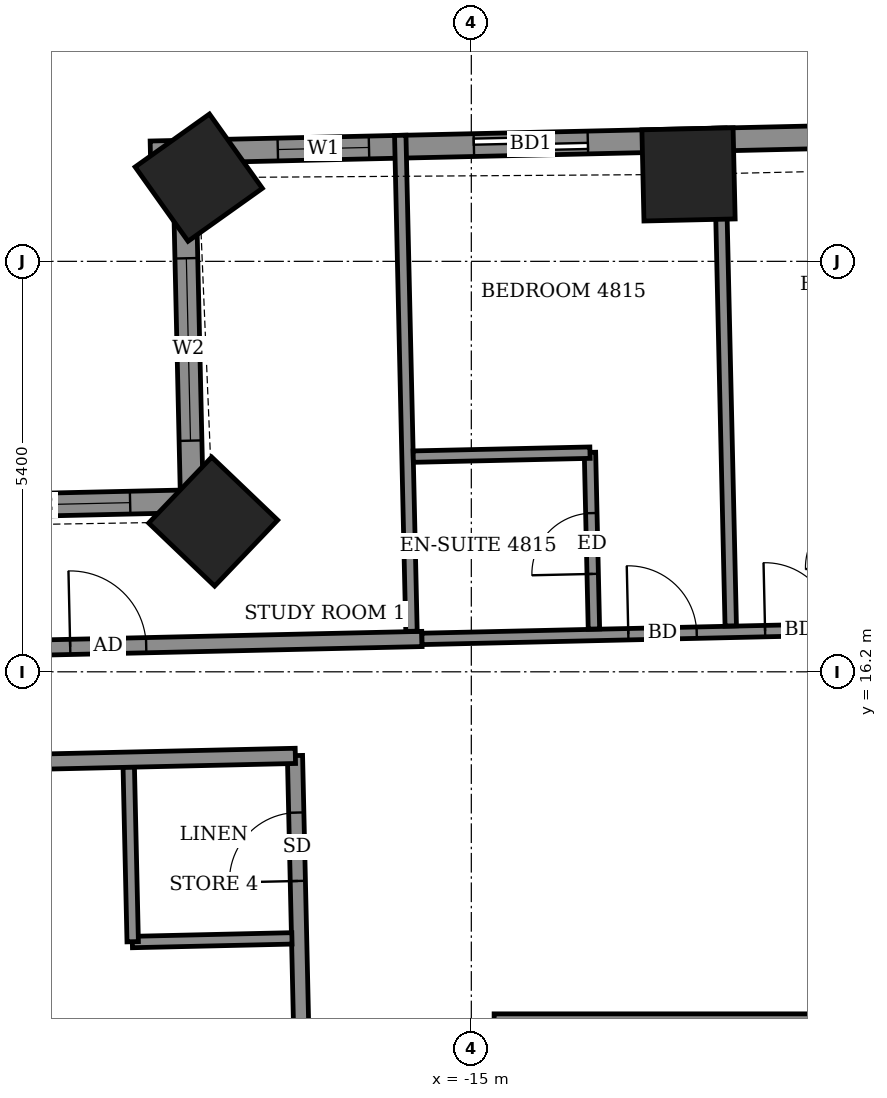
"""IFC4 building model, lengths in metres.
Left out: names, types, materials, properties, quantities, classifications, styles, units other than length and angle.
Written with IfcOpenShell. Run it as: python <this file> out.ifc"""

import sys

from ifc_helpers import new_model, si_unit, direction, frame, frame_2d, origin, origin_2d, place, context, subcontext, project, spatial, rectangle, extrude, element, fill, save


model = new_model("IFC4")
c1 = context("Model", 3, precision=1e-05, world=origin(), true_north=direction((0.0, 1.0)))
c2 = subcontext(c1, "Body", "Model", "MODEL_VIEW")
j1 = project(units=[si_unit("LENGTHUNIT", "METRE"), si_unit("PLANEANGLEUNIT", "RADIAN")], contexts=[c1])
p1 = place(None, origin())
s1 = spatial("IfcSite", under=j1, at=p1, CompositionType="ELEMENT")
p2 = place(p1, origin())
s2 = spatial("IfcBuilding", under=s1, at=p2, CompositionType="ELEMENT")
p3 = place(p2, frame((0.0, 0.0, 189.7)))
s3 = spatial("IfcBuildingStorey", under=s2, at=p3, CompositionType="ELEMENT", Elevation=189.7)
for number, where, z_axis, x_axis in (
    (1, (-12.142, 22.744, -0.55), (0.0, 0.0, 1.0), (-1.0, -0.023, 0.0)),
    (2, (-18.586, 22.701, -0.55), (0.0, 0.0, 1.0), (-0.815, -0.58, 0.0)),
    (3, (-18.396, 18.177, -0.55), (0.0, 0.0, 1.0), (-0.691, -0.723, 0.0)),
):
    element("IfcColumn", number, at=place(p3, frame(where, z_axis=z_axis, x_axis=x_axis)), inside=s3, PredefinedType="COLUMN", context=c2, shape_type="SweptSolid", body=[
        extrude(rectangle(XDim=1.2, YDim=1.2, at=origin_2d()), origin(), (0.0, 0.0, 1.0), 3.6),
    ])
p4 = place(p3, frame((21.589, 23.959, 0.0), z_axis=(0.0, 0.0, 1.0), x_axis=(-0.999742668524, -0.022684724649, 0.0)))
e4 = element("IfcWall", 4, at=p4, inside=s3, PredefinedType="SOLIDWALL", context=c2, shape_type="SweptSolid", body=[
    extrude(rectangle(XDim=40.822, YDim=0.3, at=frame_2d((20.411, 0.0))), origin(), (0.0, 0.0, 1.0), 3.05),
])
p5 = place(p4, frame((1.553, 0.0, 0.0)))
e5 = element("IfcOpeningElement", 5, at=p5, cuts=e4, PredefinedType="OPENING", context=c2, shape_type="SweptSolid", body=[
    extrude(rectangle(XDim=1.5, YDim=2.4, at=frame_2d((0.75, 1.2))), frame((0.0, 0.16, 0.0), z_axis=(0.0, -1.0, 0.0), x_axis=(1.0, 0.0, 0.0)), (0.0, 0.0, 1.0), 0.32),
])
p6 = place(p4, frame((4.33, 0.0, 0.0)))
e6 = element("IfcOpeningElement", 6, at=p6, cuts=e4, PredefinedType="OPENING", context=c2, shape_type="SweptSolid", body=[
    extrude(rectangle(XDim=1.5, YDim=2.4, at=frame_2d((0.75, 1.2))), frame((0.0, 0.16, 0.0), z_axis=(0.0, -1.0, 0.0), x_axis=(1.0, 0.0, 0.0)), (0.0, 0.0, 1.0), 0.32),
])
p7 = place(p4, frame((9.43, 0.0, 0.0)))
e7 = element("IfcOpeningElement", 7, at=p7, cuts=e4, PredefinedType="OPENING", context=c2, shape_type="SweptSolid", body=[
    extrude(rectangle(XDim=1.5, YDim=2.4, at=frame_2d((0.75, 1.2))), frame((0.0, 0.16, 0.0), z_axis=(0.0, -1.0, 0.0), x_axis=(1.0, 0.0, 0.0)), (0.0, 0.0, 1.0), 0.32),
])
p8 = place(p4, frame((14.37, 0.0, 0.0)))
e8 = element("IfcOpeningElement", 8, at=p8, cuts=e4, PredefinedType="OPENING", context=c2, shape_type="SweptSolid", body=[
    extrude(rectangle(XDim=1.5, YDim=2.4, at=frame_2d((0.75, 1.2))), frame((0.0, 0.16, 0.0), z_axis=(0.0, -1.0, 0.0), x_axis=(1.0, 0.0, 0.0)), (0.0, 0.0, 1.0), 0.32),
])
p9 = place(p4, frame((17.41, 0.0, 0.0)))
e9 = element("IfcOpeningElement", 9, at=p9, cuts=e4, PredefinedType="OPENING", context=c2, shape_type="SweptSolid", body=[
    extrude(rectangle(XDim=1.5, YDim=2.4, at=frame_2d((0.75, 1.2))), frame((0.0, 0.16, 0.0), z_axis=(0.0, -1.0, 0.0), x_axis=(1.0, 0.0, 0.0)), (0.0, 0.0, 1.0), 0.32),
])
p10 = place(p4, frame((22.03, 0.0, 0.0)))
e10 = element("IfcOpeningElement", 10, at=p10, cuts=e4, PredefinedType="OPENING", context=c2, shape_type="SweptSolid", body=[
    extrude(rectangle(XDim=1.5, YDim=2.4, at=frame_2d((0.75, 1.2))), frame((0.0, 0.16, 0.0), z_axis=(0.0, -1.0, 0.0), x_axis=(1.0, 0.0, 0.0)), (0.0, 0.0, 1.0), 0.32),
])
p11 = place(p4, frame((27.7, 0.0, 0.0)))
e11 = element("IfcOpeningElement", 11, at=p11, cuts=e4, PredefinedType="OPENING", context=c2, shape_type="SweptSolid", body=[
    extrude(rectangle(XDim=1.2, YDim=2.4, at=frame_2d((0.6, 1.2))), frame((0.0, 0.16, 0.0), z_axis=(0.0, -1.0, 0.0), x_axis=(1.0, 0.0, 0.0)), (0.0, 0.0, 1.0), 0.32),
])
p12 = place(p4, frame((30.48, 0.0, 0.0)))
e12 = element("IfcOpeningElement", 12, at=p12, cuts=e4, PredefinedType="OPENING", context=c2, shape_type="SweptSolid", body=[
    extrude(rectangle(XDim=1.5, YDim=2.4, at=frame_2d((0.75, 1.2))), frame((0.0, 0.16, 0.0), z_axis=(0.0, -1.0, 0.0), x_axis=(1.0, 0.0, 0.0)), (0.0, 0.0, 1.0), 0.32),
])
p13 = place(p4, frame((35.065, 0.0, 0.0)))
e13 = element("IfcOpeningElement", 13, at=p13, cuts=e4, PredefinedType="OPENING", context=c2, shape_type="SweptSolid", body=[
    extrude(rectangle(XDim=1.5, YDim=2.4, at=frame_2d((0.75, 1.2))), frame((0.0, 0.16, 0.0), z_axis=(0.0, -1.0, 0.0), x_axis=(1.0, 0.0, 0.0)), (0.0, 0.0, 1.0), 0.32),
])
p14 = place(p4, frame((37.945, 0.0, 0.9)))
e14 = element("IfcOpeningElement", 14, at=p14, cuts=e4, PredefinedType="OPENING", context=c2, shape_type="SweptSolid", body=[
    extrude(rectangle(XDim=1.2, YDim=1.5, at=frame_2d((0.6, 0.75))), frame((0.0, 0.16, 0.0), z_axis=(0.0, -1.0, 0.0), x_axis=(1.0, 0.0, 0.0)), (0.0, 0.0, 1.0), 0.32),
])
p15 = place(p3, frame((-18.781, 23.043, 0.0), z_axis=(0.0, 0.0, 1.0), x_axis=(0.02274729749, -0.999741246752, 0.0)))
e15 = element("IfcWall", 15, at=p15, inside=s3, PredefinedType="SOLIDWALL", context=c2, shape_type="SweptSolid", body=[
    extrude(rectangle(XDim=4.926, YDim=0.3, at=frame_2d((2.463, 0.0))), origin(), (0.0, 0.0, 1.0), 2.55),
])
p16 = place(p15, frame((1.403, 0.0, 0.9)))
e16 = element("IfcOpeningElement", 16, at=p16, cuts=e15, PredefinedType="OPENING", context=c2, shape_type="SweptSolid", body=[
    extrude(rectangle(XDim=2.4, YDim=1.5, at=frame_2d((1.2, 0.75))), frame((0.0, 0.16, 0.0), z_axis=(0.0, -1.0, 0.0), x_axis=(1.0, 0.0, 0.0)), (0.0, 0.0, 1.0), 0.32),
])
p17 = place(p3, frame((-18.676, 18.444, 0.0), z_axis=(0.0, 0.0, 1.0), x_axis=(-0.999744377441, -0.022609285172, 0.0)))
e17 = element("IfcWall", 17, at=p17, inside=s3, PredefinedType="SOLIDWALL", context=c2, shape_type="SweptSolid", body=[
    extrude(rectangle(XDim=4.6, YDim=0.3, at=frame_2d((2.3, 0.0))), origin(), (0.0, 0.0, 1.0), 2.55),
])
p18 = place(p17, frame((0.813, 0.0, 0.9)))
e18 = element("IfcOpeningElement", 18, at=p18, cuts=e17, PredefinedType="OPENING", context=c2, shape_type="SweptSolid", body=[
    extrude(rectangle(XDim=2.4, YDim=1.5, at=frame_2d((1.2, 0.75))), frame((0.0, 0.16, 0.0), z_axis=(0.0, -1.0, 0.0), x_axis=(1.0, 0.0, 0.0)), (0.0, 0.0, 1.0), 0.32),
])
p19 = place(p3, frame((-16.684, -12.919, 0.0), z_axis=(0.0, 0.0, 1.0), x_axis=(-0.022694293906, 0.999742451346, 0.0)))
e19 = element("IfcWall", 19, at=p19, inside=s3, PredefinedType="PARTITIONING", context=c2, shape_type="SweptSolid", body=[
    extrude(rectangle(XDim=28.024, YDim=0.2, at=frame_2d((14.012, 0.0))), origin(), (0.0, 0.0, 1.0), 3.05),
])
p20 = place(p19, frame((22.825, 0.0, 0.0)))
e20 = element("IfcOpeningElement", 20, at=p20, cuts=e19, PredefinedType="OPENING", context=c2, shape_type="SweptSolid", body=[
    extrude(rectangle(XDim=1.0, YDim=2.1, at=frame_2d((0.5, 1.05))), frame((0.0, 0.11, 0.0), z_axis=(0.0, -1.0, 0.0), x_axis=(1.0, 0.0, 0.0)), (0.0, 0.0, 1.0), 0.22),
])
p21 = place(p19, frame((26.374, 0.0, 0.0)))
e21 = element("IfcOpeningElement", 21, at=p21, cuts=e19, PredefinedType="OPENING", context=c2, shape_type="SweptSolid", body=[
    extrude(rectangle(XDim=0.9, YDim=2.1, at=frame_2d((0.45, 1.05))), frame((0.0, 0.11, 0.0), z_axis=(0.0, -1.0, 0.0), x_axis=(1.0, 0.0, 0.0)), (0.0, 0.0, 1.0), 0.22),
])
p22 = place(p19, frame((16.7, 0.0, 0.0)))
e22 = element("IfcOpeningElement", 22, at=p22, cuts=e19, PredefinedType="OPENING", context=c2, shape_type="SweptSolid", body=[
    extrude(rectangle(XDim=1.0, YDim=2.1, at=frame_2d((0.5, 1.05))), frame((0.0, 0.11, 0.0), z_axis=(0.0, -1.0, 0.0), x_axis=(1.0, 0.0, 0.0)), (0.0, 0.0, 1.0), 0.22),
])
p23 = place(p19, frame((19.175, 0.0, 0.0)))
e23 = element("IfcOpeningElement", 23, at=p23, cuts=e19, PredefinedType="OPENING", context=c2, shape_type="SweptSolid", body=[
    extrude(rectangle(XDim=0.9, YDim=2.1, at=frame_2d((0.45, 1.05))), frame((0.0, 0.11, 0.0), z_axis=(0.0, -1.0, 0.0), x_axis=(1.0, 0.0, 0.0)), (0.0, 0.0, 1.0), 0.22),
])
p24 = place(p19, frame((14.725, 0.0, 0.0)))
e24 = element("IfcOpeningElement", 24, at=p24, cuts=e19, PredefinedType="OPENING", context=c2, shape_type="SweptSolid", body=[
    extrude(rectangle(XDim=1.0, YDim=2.1, at=frame_2d((0.5, 1.05))), frame((0.0, 0.11, 0.0), z_axis=(0.0, -1.0, 0.0), x_axis=(1.0, 0.0, 0.0)), (0.0, 0.0, 1.0), 0.22),
])
p25 = place(p19, frame((12.625, 0.0, 0.0)))
e25 = element("IfcOpeningElement", 25, at=p25, cuts=e19, PredefinedType="OPENING", context=c2, shape_type="SweptSolid", body=[
    extrude(rectangle(XDim=0.9, YDim=2.1, at=frame_2d((0.45, 1.05))), frame((0.0, 0.11, 0.0), z_axis=(0.0, -1.0, 0.0), x_axis=(1.0, 0.0, 0.0)), (0.0, 0.0, 1.0), 0.22),
])
p26 = place(p19, frame((10.375, 0.0, 0.0)))
e26 = element("IfcOpeningElement", 26, at=p26, cuts=e19, PredefinedType="OPENING", context=c2, shape_type="SweptSolid", body=[
    extrude(rectangle(XDim=1.0, YDim=2.1, at=frame_2d((0.5, 1.05))), frame((0.0, 0.11, 0.0), z_axis=(0.0, -1.0, 0.0), x_axis=(1.0, 0.0, 0.0)), (0.0, 0.0, 1.0), 0.22),
])
p27 = place(p19, frame((8.125, 0.0, 0.0)))
e27 = element("IfcOpeningElement", 27, at=p27, cuts=e19, PredefinedType="OPENING", context=c2, shape_type="SweptSolid", body=[
    extrude(rectangle(XDim=0.9, YDim=2.1, at=frame_2d((0.45, 1.05))), frame((0.0, 0.11, 0.0), z_axis=(0.0, -1.0, 0.0), x_axis=(1.0, 0.0, 0.0)), (0.0, 0.0, 1.0), 0.22),
])
p28 = place(p19, frame((3.462, 0.0, 0.0)))
e28 = element("IfcOpeningElement", 28, at=p28, cuts=e19, PredefinedType="OPENING", context=c2, shape_type="SweptSolid", body=[
    extrude(rectangle(XDim=1.0, YDim=2.1, at=frame_2d((0.5, 1.05))), frame((0.0, 0.11, 0.0), z_axis=(0.0, -1.0, 0.0), x_axis=(1.0, 0.0, 0.0)), (0.0, 0.0, 1.0), 0.22),
])
p29 = place(p19, frame((5.625, 0.0, 0.0)))
e29 = element("IfcOpeningElement", 29, at=p29, cuts=e19, PredefinedType="OPENING", context=c2, shape_type="SweptSolid", body=[
    extrude(rectangle(XDim=0.9, YDim=2.1, at=frame_2d((0.45, 1.05))), frame((0.0, 0.11, 0.0), z_axis=(0.0, -1.0, 0.0), x_axis=(1.0, 0.0, 0.0)), (0.0, 0.0, 1.0), 0.22),
])
p30 = place(p3, frame((-19.46, 12.645, 0.0), z_axis=(0.0, 0.0, 1.0), x_axis=(0.999737799372, 0.022898307927, 0.0)))
e30 = element("IfcWall", 30, at=p30, inside=s3, PredefinedType="PARTITIONING", context=c2, shape_type="SweptSolid", body=[
    extrude(rectangle(XDim=2.1, YDim=0.15, at=frame_2d((1.05, 0.0))), origin(), (0.0, 0.0, 1.0), 3.05),
])
p31 = place(p3, frame((-19.455, 12.649, 0.0), z_axis=(0.0, 0.0, 1.0), x_axis=(-0.022603288534, 0.999744513037, 0.0)))
e31 = element("IfcWall", 31, at=p31, inside=s3, PredefinedType="PARTITIONING", context=c2, shape_type="SweptSolid", body=[
    extrude(rectangle(XDim=2.301, YDim=0.15, at=frame_2d((1.15, 0.0))), origin(), (0.0, 0.0, 1.0), 3.05),
])
p32 = place(p3, frame((-21.949, 14.989, 0.0), z_axis=(0.0, 0.0, 1.0), x_axis=(0.999743491588, 0.022648422179, 0.0)))
e32 = element("IfcWall", 32, at=p32, inside=s3, PredefinedType="PARTITIONING", context=c2, shape_type="SweptSolid", body=[
    extrude(rectangle(XDim=4.635, YDim=0.2, at=frame_2d((2.318, 0.0))), origin(), (0.0, 0.0, 1.0), 3.05),
])
p33 = place(p3, frame((-21.983, 16.489, 0.0), z_axis=(0.0, 0.0, 1.0), x_axis=(0.999744930163, 0.022584831499, 0.0)))
e33 = element("IfcWall", 33, at=p33, inside=s3, PredefinedType="PARTITIONING", context=c2, shape_type="SweptSolid", body=[
    extrude(rectangle(XDim=6.335, YDim=0.2, at=frame_2d((3.167, 0.0))), origin(), (0.0, 0.0, 1.0), 3.05),
])
p34 = place(p33, frame((1.706, 0.0, 0.0)))
e34 = element("IfcOpeningElement", 34, at=p34, cuts=e33, PredefinedType="OPENING", context=c2, shape_type="SweptSolid", body=[
    extrude(rectangle(XDim=1.0, YDim=2.1, at=frame_2d((0.5, 1.05))), frame((0.0, 0.11, 0.0), z_axis=(0.0, -1.0, 0.0), x_axis=(1.0, 0.0, 0.0)), (0.0, 0.0, 1.0), 0.22),
])
p35 = place(p3, frame((-15.649, 16.633, 0.0), z_axis=(0.0, 0.0, 1.0), x_axis=(0.999743261737, 0.022658565952, 0.0)))
e35 = element("IfcWall", 35, at=p35, inside=s3, PredefinedType="PARTITIONING", context=c2, shape_type="SweptSolid", body=[
    extrude(rectangle(XDim=30.536, YDim=0.15, at=frame_2d((15.268, 0.0))), origin(), (0.0, 0.0, 1.0), 3.05),
])
p36 = place(p35, frame((29.536, 0.0, 0.0)))
e36 = element("IfcOpeningElement", 36, at=p36, cuts=e35, PredefinedType="OPENING", context=c2, shape_type="SweptSolid", body=[
    extrude(rectangle(XDim=0.9, YDim=2.1, at=frame_2d((0.45, 1.05))), frame((0.0, 0.085, 0.0), z_axis=(0.0, -1.0, 0.0), x_axis=(1.0, 0.0, 0.0)), (0.0, 0.0, 1.0), 0.17),
])
p37 = place(p35, frame((27.965, 0.0, 0.0)))
e37 = element("IfcOpeningElement", 37, at=p37, cuts=e35, PredefinedType="OPENING", context=c2, shape_type="SweptSolid", body=[
    extrude(rectangle(XDim=0.9, YDim=2.1, at=frame_2d((0.45, 1.05))), frame((0.0, 0.085, 0.0), z_axis=(0.0, -1.0, 0.0), x_axis=(1.0, 0.0, 0.0)), (0.0, 0.0, 1.0), 0.17),
])
p38 = place(p35, frame((21.365, 0.0, 0.0)))
e38 = element("IfcOpeningElement", 38, at=p38, cuts=e35, PredefinedType="OPENING", context=c2, shape_type="SweptSolid", body=[
    extrude(rectangle(XDim=0.9, YDim=2.1, at=frame_2d((0.45, 1.05))), frame((0.0, 0.085, 0.0), z_axis=(0.0, -1.0, 0.0), x_axis=(1.0, 0.0, 0.0)), (0.0, 0.0, 1.0), 0.17),
])
p39 = place(p35, frame((19.565, 0.0, 0.0)))
e39 = element("IfcOpeningElement", 39, at=p39, cuts=e35, PredefinedType="OPENING", context=c2, shape_type="SweptSolid", body=[
    extrude(rectangle(XDim=0.9, YDim=2.1, at=frame_2d((0.45, 1.05))), frame((0.0, 0.085, 0.0), z_axis=(0.0, -1.0, 0.0), x_axis=(1.0, 0.0, 0.0)), (0.0, 0.0, 1.0), 0.17),
])
p40 = place(p35, frame((12.965, 0.0, 0.0)))
e40 = element("IfcOpeningElement", 40, at=p40, cuts=e35, PredefinedType="OPENING", context=c2, shape_type="SweptSolid", body=[
    extrude(rectangle(XDim=0.9, YDim=2.1, at=frame_2d((0.45, 1.05))), frame((0.0, 0.085, 0.0), z_axis=(0.0, -1.0, 0.0), x_axis=(1.0, 0.0, 0.0)), (0.0, 0.0, 1.0), 0.17),
])
p41 = place(p35, frame((11.14, 0.0, 0.0)))
e41 = element("IfcOpeningElement", 41, at=p41, cuts=e35, PredefinedType="OPENING", context=c2, shape_type="SweptSolid", body=[
    extrude(rectangle(XDim=0.9, YDim=2.1, at=frame_2d((0.45, 1.05))), frame((0.0, 0.085, 0.0), z_axis=(0.0, -1.0, 0.0), x_axis=(1.0, 0.0, 0.0)), (0.0, 0.0, 1.0), 0.17),
])
p42 = place(p35, frame((4.515, 0.0, 0.0)))
e42 = element("IfcOpeningElement", 42, at=p42, cuts=e35, PredefinedType="OPENING", context=c2, shape_type="SweptSolid", body=[
    extrude(rectangle(XDim=0.9, YDim=2.1, at=frame_2d((0.45, 1.05))), frame((0.0, 0.085, 0.0), z_axis=(0.0, -1.0, 0.0), x_axis=(1.0, 0.0, 0.0)), (0.0, 0.0, 1.0), 0.17),
])
p43 = place(p35, frame((2.715, 0.0, 0.0)))
e43 = element("IfcOpeningElement", 43, at=p43, cuts=e35, PredefinedType="OPENING", context=c2, shape_type="SweptSolid", body=[
    extrude(rectangle(XDim=0.9, YDim=2.1, at=frame_2d((0.45, 1.05))), frame((0.0, 0.085, 0.0), z_axis=(0.0, -1.0, 0.0), x_axis=(1.0, 0.0, 0.0)), (0.0, 0.0, 1.0), 0.17),
])
p44 = place(p3, frame((-15.787, 16.733, 0.0), z_axis=(0.0, 0.0, 1.0), x_axis=(-0.022667874761, 0.999743050715, 0.0)))
e44 = element("IfcWall", 44, at=p44, inside=s3, PredefinedType="PARTITIONING", context=c2, shape_type="SweptSolid", body=[
    extrude(rectangle(XDim=6.527, YDim=0.15, at=frame_2d((3.263, 0.0))), origin(), (0.0, 0.0, 1.0), 2.55),
])
p45 = place(p3, frame((-13.387, 16.763, 0.0), z_axis=(0.0, 0.0, 1.0), x_axis=(-0.022370700241, 0.999749744571, 0.0)))
e45 = element("IfcWall", 45, at=p45, inside=s3, PredefinedType="PARTITIONING", context=c2, shape_type="SweptSolid", body=[
    extrude(rectangle(XDim=2.324, YDim=0.15, at=frame_2d((1.162, 0.0))), origin(), (0.0, 0.0, 1.0), 3.05),
])
p46 = place(p45, frame((0.725, 0.0, 0.0)))
e46 = element("IfcOpeningElement", 46, at=p46, cuts=e45, PredefinedType="OPENING", context=c2, shape_type="SweptSolid", body=[
    extrude(rectangle(XDim=0.8, YDim=2.1, at=frame_2d((0.4, 1.05))), frame((0.0, 0.085, 0.0), z_axis=(0.0, -1.0, 0.0), x_axis=(1.0, 0.0, 0.0)), (0.0, 0.0, 1.0), 0.17),
])
p47 = place(p3, frame((-11.587, 16.804, 0.0), z_axis=(0.0, 0.0, 1.0), x_axis=(-0.022771353855, 0.999740699103, 0.0)))
e47 = element("IfcWall", 47, at=p47, inside=s3, PredefinedType="PARTITIONING", context=c2, shape_type="SweptSolid", body=[
    extrude(rectangle(XDim=6.551, YDim=0.15, at=frame_2d((3.275, 0.0))), origin(), (0.0, 0.0, 1.0), 3.05),
])
p48 = place(p3, frame((-15.764, 19.031, 0.0), z_axis=(0.0, 0.0, 1.0), x_axis=(0.999749954681, 0.022361308448, 0.0)))
e48 = element("IfcWall", 48, at=p48, inside=s3, PredefinedType="PARTITIONING", context=c2, shape_type="SweptSolid", body=[
    extrude(rectangle(XDim=2.325, YDim=0.15, at=frame_2d((1.163, 0.0))), origin(), (0.0, 0.0, 1.0), 3.05),
])
p49 = place(p3, frame((-14.7, 11.25, 0.0), z_axis=(0.0, 0.0, 1.0), x_axis=(1.0, 0.0, 0.0)))
e49 = element("IfcWall", 49, at=p49, inside=s3, PredefinedType="SHEAR", context=c2, shape_type="SweptSolid", body=[
    extrude(rectangle(XDim=29.4, YDim=0.9, at=frame_2d((14.7, 0.0))), origin(), (0.0, 0.0, 1.0), 3.6),
])
p50 = place(p13, origin())
e50 = element("IfcDoor", 50, at=p50, inside=s3, OperationType="SLIDING_TO_LEFT", PredefinedType="DOOR", context=c2, shape_type="SweptSolid", body=[
    extrude(rectangle(XDim=1.5, YDim=2.4, at=frame_2d((0.75, 1.2))), frame((0.0, 0.025, 0.0), z_axis=(0.0, -1.0, 0.0), x_axis=(1.0, 0.0, 0.0)), (0.0, 0.0, 1.0), 0.05),
])
fill(e13, e50)
p51 = place(p14, origin())
e51 = element("IfcWindow", 51, at=p51, inside=s3, PartitioningType="SINGLE_PANEL", PredefinedType="WINDOW", context=c2, shape_type="SweptSolid", body=[
    extrude(rectangle(XDim=1.2, YDim=1.5, at=frame_2d((0.6, 0.75))), frame((0.0, 0.03, 0.0), z_axis=(0.0, -1.0, 0.0), x_axis=(1.0, 0.0, 0.0)), (0.0, 0.0, 1.0), 0.06),
])
fill(e14, e51)
p52 = place(p16, origin())
e52 = element("IfcWindow", 52, at=p52, inside=s3, PartitioningType="DOUBLE_PANEL_VERTICAL", PredefinedType="WINDOW", context=c2, shape_type="SweptSolid", body=[
    extrude(rectangle(XDim=2.4, YDim=1.5, at=frame_2d((1.2, 0.75))), frame((0.0, 0.03, 0.0), z_axis=(0.0, -1.0, 0.0), x_axis=(1.0, 0.0, 0.0)), (0.0, 0.0, 1.0), 0.06),
])
fill(e16, e52)
p53 = place(p18, origin())
e53 = element("IfcWindow", 53, at=p53, inside=s3, PartitioningType="DOUBLE_PANEL_VERTICAL", PredefinedType="WINDOW", context=c2, shape_type="SweptSolid", body=[
    extrude(rectangle(XDim=2.4, YDim=1.5, at=frame_2d((1.2, 0.75))), frame((0.0, 0.03, 0.0), z_axis=(0.0, -1.0, 0.0), x_axis=(1.0, 0.0, 0.0)), (0.0, 0.0, 1.0), 0.06),
])
fill(e18, e53)
p54 = place(p42, origin())
e54 = element("IfcDoor", 54, at=p54, inside=s3, OperationType="SINGLE_SWING_RIGHT", PredefinedType="DOOR", context=c2, shape_type="SweptSolid", body=[
    extrude(rectangle(XDim=0.9, YDim=2.1, at=frame_2d((0.45, 1.05))), frame((0.0, 0.025, 0.0), z_axis=(0.0, -1.0, 0.0), x_axis=(1.0, 0.0, 0.0)), (0.0, 0.0, 1.0), 0.05),
])
fill(e42, e54)
p55 = place(p43, origin())
e55 = element("IfcDoor", 55, at=p55, inside=s3, OperationType="SINGLE_SWING_LEFT", PredefinedType="DOOR", context=c2, shape_type="SweptSolid", body=[
    extrude(rectangle(XDim=0.9, YDim=2.1, at=frame_2d((0.45, 1.05))), frame((0.0, 0.025, 0.0), z_axis=(0.0, -1.0, 0.0), x_axis=(1.0, 0.0, 0.0)), (0.0, 0.0, 1.0), 0.05),
])
fill(e43, e55)
p56 = place(p46, origin())
e56 = element("IfcDoor", 56, at=p56, inside=s3, OperationType="SINGLE_SWING_LEFT", PredefinedType="DOOR", context=c2, shape_type="SweptSolid", body=[
    extrude(rectangle(XDim=0.8, YDim=2.1, at=frame_2d((0.4, 1.05))), frame((0.0, 0.025, 0.0), z_axis=(0.0, -1.0, 0.0), x_axis=(1.0, 0.0, 0.0)), (0.0, 0.0, 1.0), 0.05),
])
fill(e46, e56)
p57 = place(p34, origin())
e57 = element("IfcDoor", 57, at=p57, inside=s3, OperationType="SINGLE_SWING_LEFT", PredefinedType="DOOR", context=c2, shape_type="SweptSolid", body=[
    extrude(rectangle(XDim=1.0, YDim=2.1, at=frame_2d((0.5, 1.05))), frame((0.0, 0.025, 0.0), z_axis=(0.0, -1.0, 0.0), x_axis=(1.0, 0.0, 0.0)), (0.0, 0.0, 1.0), 0.05),
])
fill(e34, e57)
p58 = place(p21, origin())
e58 = element("IfcDoor", 58, at=p58, inside=s3, OperationType="SINGLE_SWING_RIGHT", PredefinedType="DOOR", context=c2, shape_type="SweptSolid", body=[
    extrude(rectangle(XDim=0.9, YDim=2.1, at=frame_2d((0.45, 1.05))), frame((0.0, 0.025, 0.0), z_axis=(0.0, -1.0, 0.0), x_axis=(1.0, 0.0, 0.0)), (0.0, 0.0, 1.0), 0.05),
])
fill(e21, e58)
save(model, sys.argv[1])
